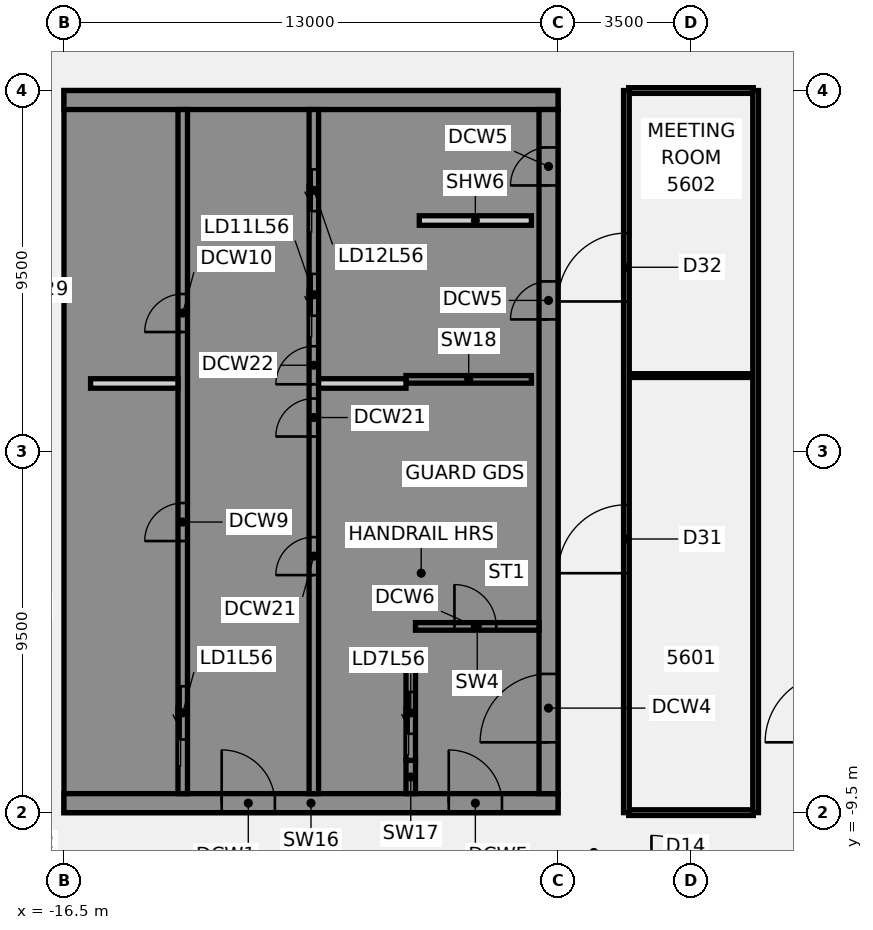
"""IFC4 building model, lengths in metres.
Left out: names, types, materials, properties, quantities, classifications, styles, units other than length and angle.
Written with IfcOpenShell. Run it as: python <this file> out.ifc"""

import sys

from ifc_helpers import new_model, si_unit, direction, frame, frame_2d, origin, place, context, subcontext, project, spatial, polyline, rectangle, outline, extrude, element, fill, save


model = new_model("IFC4")
c1 = context("Model", 3, precision=1e-05, world=origin(), true_north=direction((0.0, 1.0)))
c2 = subcontext(c1, "Body", "Model", "MODEL_VIEW")
j1 = project(units=[si_unit("LENGTHUNIT", "METRE"), si_unit("PLANEANGLEUNIT", "RADIAN")], contexts=[c1])
p1 = place(None, origin())
s1 = spatial("IfcSite", under=j1, at=p1, CompositionType="ELEMENT")
p2 = place(p1, origin())
s2 = spatial("IfcBuilding", under=s1, at=p2, CompositionType="ELEMENT")
p3 = place(p2, frame((0.0, 0.0, 223.5)))
s3 = spatial("IfcBuildingStorey", under=s2, at=p3, CompositionType="ELEMENT", Elevation=223.5)
p4 = place(p3, frame((-1.64, -9.5, 0.0), z_axis=(0.0, 0.0, 1.0), x_axis=(1.0, 0.0, 0.0)))
e1 = element("IfcWall", 1, at=p4, inside=s3, PredefinedType="PARTITIONING", context=c2, shape_type="SweptSolid", body=[
    extrude(rectangle(XDim=3.28, YDim=0.15, at=frame_2d((1.64, 0.0))), origin(), (0.0, 0.0, 1.0), 2.864),
])
p5 = place(p3, frame((-1.64, 2.0, 0.0), z_axis=(0.0, 0.0, 1.0), x_axis=(1.0, 0.0, 0.0)))
e2 = element("IfcWall", 2, at=p5, inside=s3, PredefinedType="PARTITIONING", context=c2, shape_type="SweptSolid", body=[
    extrude(rectangle(XDim=3.28, YDim=0.1, at=frame_2d((1.64, 0.0))), origin(), (0.0, 0.0, 1.0), 2.864),
])
p6 = place(p3, frame((-1.64, 9.5, 0.0), z_axis=(0.0, 0.0, 1.0), x_axis=(1.0, 0.0, 0.0)))
e3 = element("IfcWall", 3, at=p6, inside=s3, PredefinedType="PARTITIONING", context=c2, shape_type="SweptSolid", body=[
    extrude(rectangle(XDim=3.28, YDim=0.15, at=frame_2d((1.64, 0.0))), origin(), (0.0, 0.0, 1.0), 2.864),
])
p7 = place(p3, frame((-1.7, -9.5, 0.0), z_axis=(0.0, 0.0, 1.0), x_axis=(0.0, 1.0, 0.0)))
e4 = element("IfcWall", 4, at=p7, inside=s3, PredefinedType="PARTITIONING", context=c2, shape_type="SweptSolid", body=[
    extrude(rectangle(XDim=19.0, YDim=0.15, at=frame_2d((9.5, 0.0))), origin(), (0.0, 0.0, 1.0), 2.864),
])
p8 = place(p7, frame((6.3, 0.0, 0.0)))
e5 = element("IfcOpeningElement", 5, at=p8, cuts=e4, PredefinedType="OPENING", context=c2, shape_type="SweptSolid", body=[
    extrude(rectangle(XDim=1.8, YDim=2.1, at=frame_2d((0.9, 1.05))), frame((0.0, 0.085, 0.0), z_axis=(0.0, -1.0, 0.0), x_axis=(1.0, 0.0, 0.0)), (0.0, 0.0, 1.0), 0.17),
])
p9 = place(p7, frame((13.45, 0.0, 0.0)))
e6 = element("IfcOpeningElement", 6, at=p9, cuts=e4, PredefinedType="OPENING", context=c2, shape_type="SweptSolid", body=[
    extrude(rectangle(XDim=1.8, YDim=2.1, at=frame_2d((0.9, 1.05))), frame((0.0, 0.085, 0.0), z_axis=(0.0, -1.0, 0.0), x_axis=(1.0, 0.0, 0.0)), (0.0, 0.0, 1.0), 0.17),
])
p10 = place(p3, frame((1.7, -9.5, 0.0), z_axis=(0.0, 0.0, 1.0), x_axis=(0.0, 1.0, 0.0)))
e7 = element("IfcWall", 7, at=p10, inside=s3, PredefinedType="PARTITIONING", context=c2, shape_type="SweptSolid", body=[
    extrude(rectangle(XDim=19.0, YDim=0.15, at=frame_2d((9.5, 0.0))), origin(), (0.0, 0.0, 1.0), 2.864),
])
p11 = place(p3, frame((-16.5, -9.25, 0.0), z_axis=(0.0, 0.0, 1.0), x_axis=(1.0, 0.0, 0.0)))
e8 = element("IfcWall", 8, at=p11, inside=s3, PredefinedType="SHEAR", context=c2, shape_type="SweptSolid", body=[
    extrude(rectangle(XDim=13.0, YDim=0.5, at=frame_2d((6.5, 0.0))), origin(), (0.0, 0.0, 1.0), 3.46),
])
p12 = place(p11, frame((4.15, 0.0, 0.0)))
e9 = element("IfcOpeningElement", 9, at=p12, cuts=e8, PredefinedType="OPENING", context=c2, shape_type="SweptSolid", body=[
    extrude(rectangle(XDim=1.4, YDim=2.1, at=frame_2d((0.7, 1.05))), frame((0.0, 0.26, 0.0), z_axis=(0.0, -1.0, 0.0), x_axis=(1.0, 0.0, 0.0)), (0.0, 0.0, 1.0), 0.52),
])
p13 = place(p11, frame((10.125, 0.0, 0.0)))
e10 = element("IfcOpeningElement", 10, at=p13, cuts=e8, PredefinedType="OPENING", context=c2, shape_type="SweptSolid", body=[
    extrude(rectangle(XDim=1.4, YDim=2.1, at=frame_2d((0.7, 1.05))), frame((0.0, 0.26, 0.0), z_axis=(0.0, -1.0, 0.0), x_axis=(1.0, 0.0, 0.0)), (0.0, 0.0, 1.0), 0.52),
])
p14 = place(p3, origin())
e11 = element("IfcWall", 11, at=p14, inside=s3, PredefinedType="SHEAR", context=c2, shape_type="SweptSolid", body=[
    extrude(outline(polyline([(-13.5, -8.125), (-16.0, -8.125), (-16.0, -5.625), (-13.5, -5.625), (-13.5, -5.375), (-16.0, -5.375), (-16.0, 5.375), (-13.5, 5.375), (-13.5, 5.625), (-16.0, 5.625), (-16.0, 8.125), (-13.5, 8.125), (-13.5, 9.0), (-16.0, 9.0), (-16.5, 9.0), (-16.5, -9.0), (-16.0, -9.0), (-13.5, -9.0), (-13.5, -8.125)])), origin(), (0.0, 0.0, 1.0), 3.46),
])
p15 = place(p3, frame((-16.5, 9.25, 0.0), z_axis=(0.0, 0.0, 1.0), x_axis=(1.0, 0.0, 0.0)))
e12 = element("IfcWall", 12, at=p15, inside=s3, PredefinedType="SHEAR", context=c2, shape_type="SweptSolid", body=[
    extrude(rectangle(XDim=13.0, YDim=0.5, at=frame_2d((6.5, 0.0))), origin(), (0.0, 0.0, 1.0), 3.46),
])
p16 = place(p3, origin())
e13 = element("IfcWall", 13, at=p16, inside=s3, PredefinedType="SHEAR", context=c2, shape_type="SweptSolid", body=[
    extrude(outline(polyline([(-9.8, -5.375), (-9.8, -5.625), (-7.5, -5.625), (-7.25, -5.625), (-7.25, 9.0), (-7.5, 9.0), (-9.8, 9.0), (-9.8, 8.125), (-7.5, 8.125), (-7.5, 5.625), (-9.8, 5.625), (-9.8, 5.375), (-7.5, 5.375), (-7.5, 2.875), (-9.8, 2.875), (-9.8, 2.625), (-7.5, 2.625), (-7.5, -5.375), (-9.8, -5.375)])), origin(), (0.0, 0.0, 1.0), 3.46),
])
p17 = place(p3, origin())
e14 = element("IfcWall", 14, at=p17, inside=s3, PredefinedType="SHEAR", context=c2, shape_type="SweptSolid", body=[
    extrude(outline(polyline([(-7.5, -8.125), (-9.55, -8.125), (-9.55, -5.625), (-9.8, -5.625), (-9.8, -8.125), (-9.8, -9.0), (-7.5, -9.0), (-7.5, -8.125)])), origin(), (0.0, 0.0, 1.0), 3.46),
])
p18 = place(p3, frame((-7.375, -9.0, 0.0), z_axis=(0.0, 0.0, 1.0), x_axis=(0.0, 1.0, 0.0)))
e15 = element("IfcWall", 15, at=p18, inside=s3, PredefinedType="SHEAR", context=c2, shape_type="SweptSolid", body=[
    extrude(rectangle(XDim=0.875, YDim=0.25, at=frame_2d((0.438, 0.0))), origin(), (0.0, 0.0, 1.0), 3.46),
])
p19 = place(p3, frame((-7.5, 1.9, 0.0), z_axis=(0.0, 0.0, 1.0), x_axis=(1.0, 0.0, 0.0)))
e16 = element("IfcWall", 16, at=p19, inside=s3, PredefinedType="SHEAR", context=c2, shape_type="SweptSolid", body=[
    extrude(rectangle(XDim=3.3, YDim=0.2, at=frame_2d((1.65, 0.0))), origin(), (0.0, 0.0, 1.0), 3.46),
])
p20 = place(p3, frame((-13.375, -9.0, 0.0), z_axis=(0.0, 0.0, 1.0), x_axis=(0.0, 1.0, 0.0)))
e17 = element("IfcWall", 17, at=p20, inside=s3, PredefinedType="SHEAR", context=c2, shape_type="SweptSolid", body=[
    extrude(rectangle(XDim=18.0, YDim=0.25, at=frame_2d((9.0, 0.0))), origin(), (0.0, 0.0, 1.0), 3.46),
])
p21 = place(p20, frame((1.425, 0.0, 0.0)))
e18 = element("IfcOpeningElement", 18, at=p21, cuts=e17, PredefinedType="OPENING", context=c2, shape_type="SweptSolid", body=[
    extrude(rectangle(XDim=1.4, YDim=2.1, at=frame_2d((0.7, 1.05))), frame((0.0, 0.135, 0.0), z_axis=(0.0, -1.0, 0.0), x_axis=(1.0, 0.0, 0.0)), (0.0, 0.0, 1.0), 0.27),
])
p22 = place(p20, frame((6.646, 0.0, 0.0)))
e19 = element("IfcOpeningElement", 19, at=p22, cuts=e17, PredefinedType="OPENING", context=c2, shape_type="SweptSolid", body=[
    extrude(rectangle(XDim=1.0, YDim=2.1, at=frame_2d((0.5, 1.05))), frame((0.0, 0.135, 0.0), z_axis=(0.0, -1.0, 0.0), x_axis=(1.0, 0.0, 0.0)), (0.0, 0.0, 1.0), 0.27),
])
p23 = place(p20, frame((12.146, 0.0, 0.0)))
e20 = element("IfcOpeningElement", 20, at=p23, cuts=e17, PredefinedType="OPENING", context=c2, shape_type="SweptSolid", body=[
    extrude(rectangle(XDim=1.0, YDim=2.1, at=frame_2d((0.5, 1.05))), frame((0.0, 0.135, 0.0), z_axis=(0.0, -1.0, 0.0), x_axis=(1.0, 0.0, 0.0)), (0.0, 0.0, 1.0), 0.27),
])
p24 = place(p3, frame((-9.925, -9.0, 0.0), z_axis=(0.0, 0.0, 1.0), x_axis=(0.0, 1.0, 0.0)))
e21 = element("IfcWall", 21, at=p24, inside=s3, PredefinedType="SHEAR", context=c2, shape_type="SweptSolid", body=[
    extrude(rectangle(XDim=18.0, YDim=0.25, at=frame_2d((9.0, 0.0))), origin(), (0.0, 0.0, 1.0), 3.46),
])
p25 = place(p24, frame((12.575, 0.0, 0.0)))
e22 = element("IfcOpeningElement", 22, at=p25, cuts=e21, PredefinedType="OPENING", context=c2, shape_type="SweptSolid", body=[
    extrude(rectangle(XDim=1.1, YDim=2.1, at=frame_2d((0.55, 1.05))), frame((0.0, 0.135, 0.0), z_axis=(0.0, -1.0, 0.0), x_axis=(1.0, 0.0, 0.0)), (0.0, 0.0, 1.0), 0.27),
])
p26 = place(p24, frame((15.325, 0.0, 0.0)))
e23 = element("IfcOpeningElement", 23, at=p26, cuts=e21, PredefinedType="OPENING", context=c2, shape_type="SweptSolid", body=[
    extrude(rectangle(XDim=1.1, YDim=2.1, at=frame_2d((0.55, 1.05))), frame((0.0, 0.135, 0.0), z_axis=(0.0, -1.0, 0.0), x_axis=(1.0, 0.0, 0.0)), (0.0, 0.0, 1.0), 0.27),
])
p27 = place(p24, frame((5.75, 0.0, 0.0)))
e24 = element("IfcOpeningElement", 24, at=p27, cuts=e21, PredefinedType="OPENING", context=c2, shape_type="SweptSolid", body=[
    extrude(rectangle(XDim=1.0, YDim=2.1, at=frame_2d((0.5, 1.05))), frame((0.0, 0.135, 0.0), z_axis=(0.0, -1.0, 0.0), x_axis=(1.0, 0.0, 0.0)), (0.0, 0.0, 1.0), 0.27),
])
p28 = place(p24, frame((9.396, 0.0, 0.0)))
e25 = element("IfcOpeningElement", 25, at=p28, cuts=e21, PredefinedType="OPENING", context=c2, shape_type="SweptSolid", body=[
    extrude(rectangle(XDim=1.0, YDim=2.1, at=frame_2d((0.5, 1.05))), frame((0.0, 0.135, 0.0), z_axis=(0.0, -1.0, 0.0), x_axis=(1.0, 0.0, 0.0)), (0.0, 0.0, 1.0), 0.27),
])
p29 = place(p24, frame((10.771, 0.0, 0.0)))
e26 = element("IfcOpeningElement", 26, at=p29, cuts=e21, PredefinedType="OPENING", context=c2, shape_type="SweptSolid", body=[
    extrude(rectangle(XDim=1.0, YDim=2.1, at=frame_2d((0.5, 1.05))), frame((0.0, 0.135, 0.0), z_axis=(0.0, -1.0, 0.0), x_axis=(1.0, 0.0, 0.0)), (0.0, 0.0, 1.0), 0.27),
])
p30 = place(p3, frame((-7.375, -8.125, 0.0), z_axis=(0.0, 0.0, 1.0), x_axis=(0.0, 1.0, 0.0)))
e27 = element("IfcWall", 27, at=p30, inside=s3, PredefinedType="SHEAR", context=c2, shape_type="SweptSolid", body=[
    extrude(rectangle(XDim=2.5, YDim=0.25, at=frame_2d((1.25, 0.0))), origin(), (0.0, 0.0, 1.0), 3.46),
])
p31 = place(p30, frame((0.7, 0.0, 0.0)))
e28 = element("IfcOpeningElement", 28, at=p31, cuts=e27, PredefinedType="OPENING", context=c2, shape_type="SweptSolid", body=[
    extrude(rectangle(XDim=1.1, YDim=2.1, at=frame_2d((0.55, 1.05))), frame((0.0, 0.135, 0.0), z_axis=(0.0, -1.0, 0.0), x_axis=(1.0, 0.0, 0.0)), (0.0, 0.0, 1.0), 0.27),
])
p32 = place(p3, frame((-3.75, -9.0, 0.0), z_axis=(0.0, 0.0, 1.0), x_axis=(0.0, 1.0, 0.0)))
e29 = element("IfcWall", 29, at=p32, inside=s3, PredefinedType="SHEAR", context=c2, shape_type="SweptSolid", body=[
    extrude(rectangle(XDim=18.0, YDim=0.5, at=frame_2d((9.0, 0.0))), origin(), (0.0, 0.0, 1.0), 3.46),
])
p33 = place(p32, frame((1.35, 0.0, 0.0)))
e30 = element("IfcOpeningElement", 30, at=p33, cuts=e29, PredefinedType="OPENING", context=c2, shape_type="SweptSolid", body=[
    extrude(rectangle(XDim=1.8, YDim=2.1, at=frame_2d((0.9, 1.05))), frame((0.0, 0.26, 0.0), z_axis=(0.0, -1.0, 0.0), x_axis=(1.0, 0.0, 0.0)), (0.0, 0.0, 1.0), 0.52),
])
p34 = place(p32, frame((12.478, 0.0, 0.0)))
e31 = element("IfcOpeningElement", 31, at=p34, cuts=e29, PredefinedType="OPENING", context=c2, shape_type="SweptSolid", body=[
    extrude(rectangle(XDim=1.0, YDim=2.1, at=frame_2d((0.5, 1.05))), frame((0.0, 0.26, 0.0), z_axis=(0.0, -1.0, 0.0), x_axis=(1.0, 0.0, 0.0)), (0.0, 0.0, 1.0), 0.52),
])
p35 = place(p32, frame((16.002, 0.0, 0.0)))
e32 = element("IfcOpeningElement", 32, at=p35, cuts=e29, PredefinedType="OPENING", context=c2, shape_type="SweptSolid", body=[
    extrude(rectangle(XDim=1.0, YDim=2.1, at=frame_2d((0.5, 1.05))), frame((0.0, 0.26, 0.0), z_axis=(0.0, -1.0, 0.0), x_axis=(1.0, 0.0, 0.0)), (0.0, 0.0, 1.0), 0.52),
])
p36 = place(p3, frame((-7.15, 6.08, 0.0), z_axis=(0.0, 0.0, 1.0), x_axis=(1.0, 0.0, 0.0)))
e33 = element("IfcWall", 33, at=p36, inside=s3, PredefinedType="PARTITIONING", context=c2, shape_type="SweptSolid", body=[
    extrude(rectangle(XDim=2.95, YDim=0.25, at=frame_2d((1.475, 0.0))), origin(), (0.0, 0.0, 1.0), 3.46),
])
p37 = place(p3, frame((-7.25, -4.6, 0.0), z_axis=(0.0, 0.0, 1.0), x_axis=(1.0, 0.0, 0.0)))
e34 = element("IfcWall", 34, at=p37, inside=s3, PredefinedType="SHEAR", context=c2, shape_type="SweptSolid", body=[
    extrude(rectangle(XDim=3.25, YDim=0.2, at=frame_2d((1.625, 0.0))), origin(), (0.0, 0.0, 1.0), 3.46),
])
p38 = place(p37, frame((1.025, 0.0, 0.0)))
e35 = element("IfcOpeningElement", 35, at=p38, cuts=e34, PredefinedType="OPENING", context=c2, shape_type="SweptSolid", body=[
    extrude(rectangle(XDim=1.1, YDim=2.1, at=frame_2d((0.55, 1.05))), frame((0.0, 0.11, 0.0), z_axis=(0.0, -1.0, 0.0), x_axis=(1.0, 0.0, 0.0)), (0.0, 0.0, 1.0), 0.22),
])
for number, where, z_axis, x_axis in (
    (36, (-15.8, 1.792, 0.0), (0.0, 0.0, 1.0), (1.0, 0.0, 0.0)),
    (37, (-9.8, 1.792, 0.0), (0.0, 0.0, 1.0), (1.0, 0.0, 0.0)),
):
    element("IfcWall", number, at=place(p3, frame(where, z_axis=z_axis, x_axis=x_axis)), inside=s3, PredefinedType="PARTITIONING", context=c2, shape_type="SweptSolid", body=[
        extrude(rectangle(XDim=2.3, YDim=0.25, at=frame_2d((1.15, 0.0))), origin(), (0.0, 0.0, 1.0), 3.46),
    ])
p39 = place(p8, frame((1.8, 0.0, 0.0), z_axis=(0.0, 0.0, 1.0), x_axis=(-1.0, 0.0, 0.0)))
e38 = element("IfcDoor", 38, at=p39, inside=s3, OperationType="DOUBLE_DOOR_SINGLE_SWING", PredefinedType="DOOR", context=c2, shape_type="SweptSolid", body=[
    extrude(rectangle(XDim=1.8, YDim=2.1, at=frame_2d((0.9, 1.05))), frame((0.0, 0.025, 0.0), z_axis=(0.0, -1.0, 0.0), x_axis=(1.0, 0.0, 0.0)), (0.0, 0.0, 1.0), 0.05),
])
fill(e5, e38)
p40 = place(p9, frame((1.8, 0.0, 0.0), z_axis=(0.0, 0.0, 1.0), x_axis=(-1.0, 0.0, 0.0)))
e39 = element("IfcDoor", 39, at=p40, inside=s3, OperationType="DOUBLE_DOOR_SINGLE_SWING", PredefinedType="DOOR", context=c2, shape_type="SweptSolid", body=[
    extrude(rectangle(XDim=1.8, YDim=2.1, at=frame_2d((0.9, 1.05))), frame((0.0, 0.025, 0.0), z_axis=(0.0, -1.0, 0.0), x_axis=(1.0, 0.0, 0.0)), (0.0, 0.0, 1.0), 0.05),
])
fill(e6, e39)
p41 = place(p12, origin())
e40 = element("IfcDoor", 40, at=p41, inside=s3, OperationType="SINGLE_SWING_LEFT", PredefinedType="DOOR", context=c2, shape_type="SweptSolid", body=[
    extrude(rectangle(XDim=1.4, YDim=2.1, at=frame_2d((0.7, 1.05))), frame((0.0, 0.025, 0.0), z_axis=(0.0, -1.0, 0.0), x_axis=(1.0, 0.0, 0.0)), (0.0, 0.0, 1.0), 0.05),
])
fill(e9, e40)
p42 = place(p13, origin())
e41 = element("IfcDoor", 41, at=p42, inside=s3, OperationType="SINGLE_SWING_LEFT", PredefinedType="DOOR", context=c2, shape_type="SweptSolid", body=[
    extrude(rectangle(XDim=1.4, YDim=2.1, at=frame_2d((0.7, 1.05))), frame((0.0, 0.025, 0.0), z_axis=(0.0, -1.0, 0.0), x_axis=(1.0, 0.0, 0.0)), (0.0, 0.0, 1.0), 0.05),
])
fill(e10, e41)
p43 = place(p33, origin())
e42 = element("IfcDoor", 42, at=p43, inside=s3, OperationType="SINGLE_SWING_LEFT", PredefinedType="DOOR", context=c2, shape_type="SweptSolid", body=[
    extrude(rectangle(XDim=1.8, YDim=2.1, at=frame_2d((0.9, 1.05))), frame((0.0, 0.025, 0.0), z_axis=(0.0, -1.0, 0.0), x_axis=(1.0, 0.0, 0.0)), (0.0, 0.0, 1.0), 0.05),
])
fill(e30, e42)
p44 = place(p34, origin())
e43 = element("IfcDoor", 43, at=p44, inside=s3, OperationType="SINGLE_SWING_LEFT", PredefinedType="DOOR", context=c2, shape_type="SweptSolid", body=[
    extrude(rectangle(XDim=1.0, YDim=2.1, at=frame_2d((0.5, 1.05))), frame((0.0, 0.225, 0.0), z_axis=(0.0, -1.0, 0.0), x_axis=(1.0, 0.0, 0.0)), (0.0, 0.0, 1.0), 0.05),
])
fill(e31, e43)
p45 = place(p35, origin())
e44 = element("IfcDoor", 44, at=p45, inside=s3, OperationType="SINGLE_SWING_LEFT", PredefinedType="DOOR", context=c2, shape_type="SweptSolid", body=[
    extrude(rectangle(XDim=1.0, YDim=2.1, at=frame_2d((0.5, 1.05))), frame((0.0, 0.225, 0.0), z_axis=(0.0, -1.0, 0.0), x_axis=(1.0, 0.0, 0.0)), (0.0, 0.0, 1.0), 0.05),
])
fill(e32, e44)
p46 = place(p38, origin())
e45 = element("IfcDoor", 45, at=p46, inside=s3, OperationType="SINGLE_SWING_LEFT", PredefinedType="DOOR", context=c2, shape_type="SweptSolid", body=[
    extrude(rectangle(XDim=1.1, YDim=2.1, at=frame_2d((0.55, 1.05))), frame((0.0, 0.025, 0.0), z_axis=(0.0, -1.0, 0.0), x_axis=(1.0, 0.0, 0.0)), (0.0, 0.0, 1.0), 0.05),
])
fill(e35, e45)
p47 = place(p21, origin())
e46 = element("IfcDoor", 46, at=p47, inside=s3, OperationType="SLIDING_TO_LEFT", PredefinedType="DOOR", context=c2, shape_type="SweptSolid", body=[
    extrude(rectangle(XDim=1.4, YDim=2.1, at=frame_2d((0.7, 1.05))), frame((0.0, 0.025, 0.0), z_axis=(0.0, -1.0, 0.0), x_axis=(1.0, 0.0, 0.0)), (0.0, 0.0, 1.0), 0.05),
])
fill(e18, e46)
p48 = place(p31, origin())
e47 = element("IfcDoor", 47, at=p48, inside=s3, OperationType="SLIDING_TO_LEFT", PredefinedType="DOOR", context=c2, shape_type="SweptSolid", body=[
    extrude(rectangle(XDim=1.1, YDim=2.1, at=frame_2d((0.55, 1.05))), frame((0.0, 0.025, 0.0), z_axis=(0.0, -1.0, 0.0), x_axis=(1.0, 0.0, 0.0)), (0.0, 0.0, 1.0), 0.05),
])
fill(e28, e47)
p49 = place(p25, origin())
e48 = element("IfcDoor", 48, at=p49, inside=s3, OperationType="SLIDING_TO_LEFT", PredefinedType="DOOR", context=c2, shape_type="SweptSolid", body=[
    extrude(rectangle(XDim=1.1, YDim=2.1, at=frame_2d((0.55, 1.05))), frame((0.0, 0.025, 0.0), z_axis=(0.0, -1.0, 0.0), x_axis=(1.0, 0.0, 0.0)), (0.0, 0.0, 1.0), 0.05),
])
fill(e22, e48)
p50 = place(p26, origin())
e49 = element("IfcDoor", 49, at=p50, inside=s3, OperationType="SLIDING_TO_LEFT", PredefinedType="DOOR", context=c2, shape_type="SweptSolid", body=[
    extrude(rectangle(XDim=1.1, YDim=2.1, at=frame_2d((0.55, 1.05))), frame((0.0, 0.025, 0.0), z_axis=(0.0, -1.0, 0.0), x_axis=(1.0, 0.0, 0.0)), (0.0, 0.0, 1.0), 0.05),
])
fill(e23, e49)
p51 = place(p22, origin())
e50 = element("IfcDoor", 50, at=p51, inside=s3, OperationType="SINGLE_SWING_LEFT", PredefinedType="DOOR", context=c2, shape_type="SweptSolid", body=[
    extrude(rectangle(XDim=1.0, YDim=2.1, at=frame_2d((0.5, 1.05))), frame((0.0, 0.025, 0.0), z_axis=(0.0, -1.0, 0.0), x_axis=(1.0, 0.0, 0.0)), (0.0, 0.0, 1.0), 0.05),
])
fill(e19, e50)
p52 = place(p23, origin())
e51 = element("IfcDoor", 51, at=p52, inside=s3, OperationType="SINGLE_SWING_LEFT", PredefinedType="DOOR", context=c2, shape_type="SweptSolid", body=[
    extrude(rectangle(XDim=1.0, YDim=2.1, at=frame_2d((0.5, 1.05))), frame((0.0, 0.025, 0.0), z_axis=(0.0, -1.0, 0.0), x_axis=(1.0, 0.0, 0.0)), (0.0, 0.0, 1.0), 0.05),
])
fill(e20, e51)
p53 = place(p27, origin())
e52 = element("IfcDoor", 52, at=p53, inside=s3, OperationType="SINGLE_SWING_LEFT", PredefinedType="DOOR", context=c2, shape_type="SweptSolid", body=[
    extrude(rectangle(XDim=1.0, YDim=2.1, at=frame_2d((0.5, 1.05))), frame((0.0, 0.025, 0.0), z_axis=(0.0, -1.0, 0.0), x_axis=(1.0, 0.0, 0.0)), (0.0, 0.0, 1.0), 0.05),
])
fill(e24, e52)
p54 = place(p28, origin())
e53 = element("IfcDoor", 53, at=p54, inside=s3, OperationType="SINGLE_SWING_LEFT", PredefinedType="DOOR", context=c2, shape_type="SweptSolid", body=[
    extrude(rectangle(XDim=1.0, YDim=2.1, at=frame_2d((0.5, 1.05))), frame((0.0, 0.025, 0.0), z_axis=(0.0, -1.0, 0.0), x_axis=(1.0, 0.0, 0.0)), (0.0, 0.0, 1.0), 0.05),
])
fill(e25, e53)
p55 = place(p29, origin())
e54 = element("IfcDoor", 54, at=p55, inside=s3, OperationType="SINGLE_SWING_LEFT", PredefinedType="DOOR", context=c2, shape_type="SweptSolid", body=[
    extrude(rectangle(XDim=1.0, YDim=2.1, at=frame_2d((0.5, 1.05))), frame((0.0, 0.025, 0.0), z_axis=(0.0, -1.0, 0.0), x_axis=(1.0, 0.0, 0.0)), (0.0, 0.0, 1.0), 0.05),
])
fill(e26, e54)
save(model, sys.argv[1])
